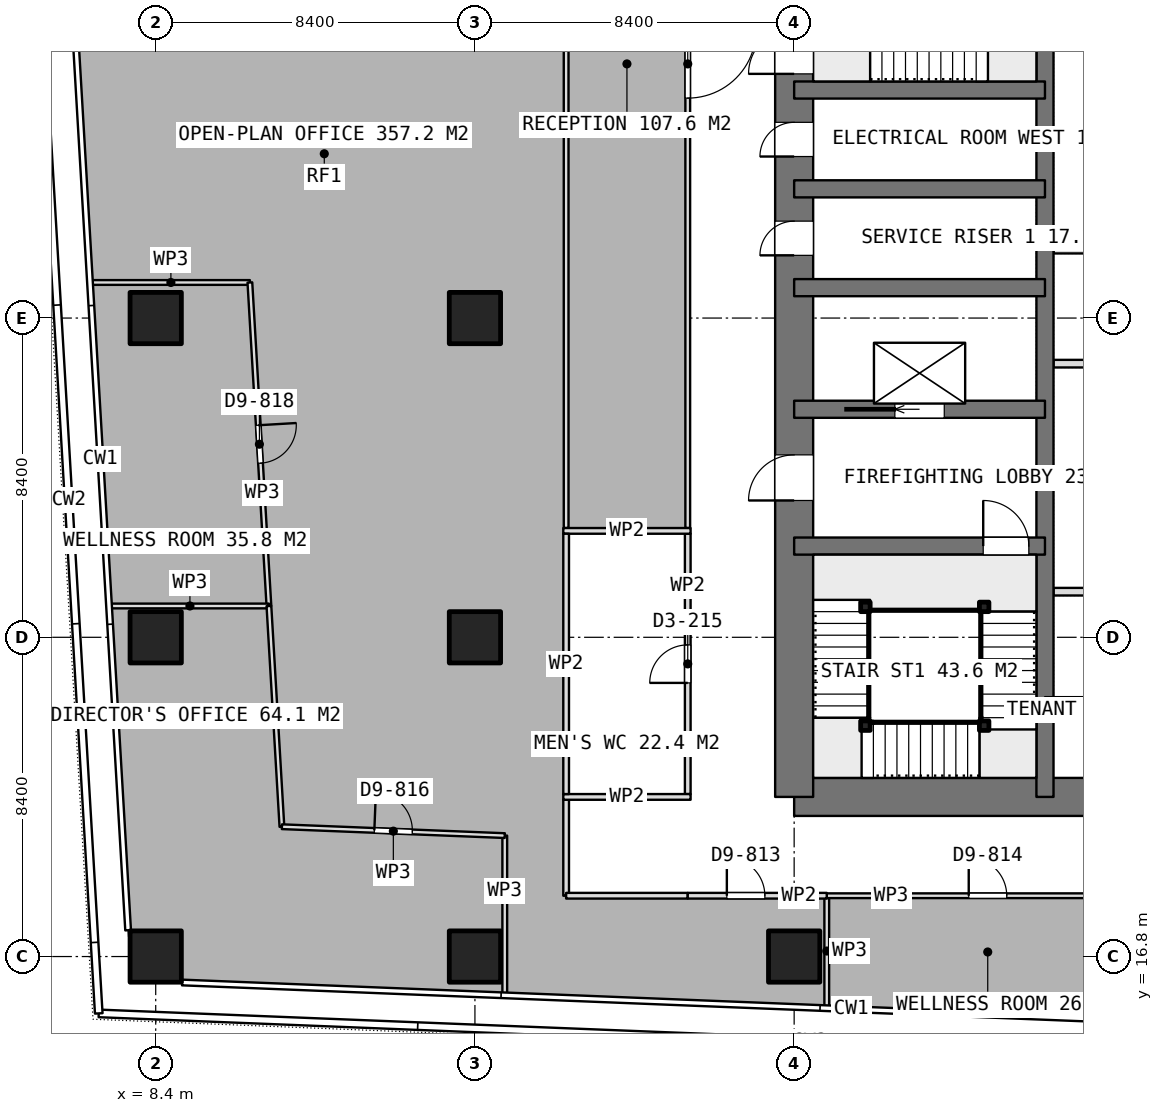
"""IFC4 building model, lengths in metres.
Left out: names, types, materials, properties, quantities, classifications, styles, units other than length and angle.
Written with IfcOpenShell. Run it as: python <this file> out.ifc"""

import sys

from ifc_helpers import new_model, si_unit, direction, frame, frame_2d, origin, origin_2d, place, context, subcontext, project, spatial, rectangle, extrude, element, fill, save


model = new_model("IFC4")
c1 = context("Model", 3, precision=1e-05, world=origin(), true_north=direction((0.0, 1.0)))
c2 = subcontext(c1, "Body", "Model", "MODEL_VIEW")
j1 = project(units=[si_unit("LENGTHUNIT", "METRE"), si_unit("PLANEANGLEUNIT", "RADIAN")], contexts=[c1])
p1 = place(None, origin())
s1 = spatial("IfcSite", under=j1, at=p1, CompositionType="ELEMENT")
p2 = place(p1, origin())
s2 = spatial("IfcBuilding", under=s1, at=p2, CompositionType="ELEMENT")
p3 = place(p2, frame((0.0, 0.0, 202.7)))
s3 = spatial("IfcBuildingStorey", under=s2, at=p3, CompositionType="ELEMENT", Elevation=202.7)
p4 = place(p3, frame((25.2, 21.0, 0.0), z_axis=(0.0, 0.0, 1.0), x_axis=(1.0, 0.0, 0.0)))
e1 = element("IfcWall", 1, at=p4, inside=s3, PredefinedType="SHEAR", context=c2, shape_type="SweptSolid", body=[
    extrude(rectangle(XDim=10.4, YDim=1.0, at=frame_2d((5.2, 0.0))), origin(), (0.0, 0.0, 1.0), 3.75),
])
p5 = place(p3, frame((25.2, 21.0, 0.0), z_axis=(0.0, 0.0, 1.0), x_axis=(0.0, 1.0, 0.0)))
e2 = element("IfcWall", 2, at=p5, inside=s3, PredefinedType="SHEAR", context=c2, shape_type="SweptSolid", body=[
    extrude(rectangle(XDim=25.2, YDim=1.0, at=frame_2d((12.6, 0.0))), origin(), (0.0, 0.0, 1.0), 3.75),
])
p6 = place(p5, frame((7.8, 0.0, 0.0)))
e3 = element("IfcOpeningElement", 3, at=p6, cuts=e2, PredefinedType="OPENING", context=c2, shape_type="SweptSolid", body=[
    extrude(rectangle(XDim=1.2, YDim=2.1, at=frame_2d((0.6, 1.05))), frame((0.0, 0.51, 0.0), z_axis=(0.0, -1.0, 0.0), x_axis=(1.0, 0.0, 0.0)), (0.0, 0.0, 1.0), 1.02),
])
p7 = place(p5, frame((14.25, 0.0, 0.0)))
e4 = element("IfcOpeningElement", 4, at=p7, cuts=e2, PredefinedType="OPENING", context=c2, shape_type="SweptSolid", body=[
    extrude(rectangle(XDim=0.9, YDim=2.1, at=frame_2d((0.45, 1.05))), frame((0.0, 0.51, 0.0), z_axis=(0.0, -1.0, 0.0), x_axis=(1.0, 0.0, 0.0)), (0.0, 0.0, 1.0), 1.02),
])
p8 = place(p5, frame((16.85, 0.0, 0.0)))
e5 = element("IfcOpeningElement", 5, at=p8, cuts=e2, PredefinedType="OPENING", context=c2, shape_type="SweptSolid", body=[
    extrude(rectangle(XDim=0.9, YDim=2.1, at=frame_2d((0.45, 1.05))), frame((0.0, 0.51, 0.0), z_axis=(0.0, -1.0, 0.0), x_axis=(1.0, 0.0, 0.0)), (0.0, 0.0, 1.0), 1.02),
])
p9 = place(p5, frame((19.025, 0.0, 0.0)))
e6 = element("IfcOpeningElement", 6, at=p9, cuts=e2, PredefinedType="OPENING", context=c2, shape_type="SweptSolid", body=[
    extrude(rectangle(XDim=1.2, YDim=2.1, at=frame_2d((0.6, 1.05))), frame((0.0, 0.51, 0.0), z_axis=(0.0, -1.0, 0.0), x_axis=(1.0, 0.0, 0.0)), (0.0, 0.0, 1.0), 1.02),
])
p10 = place(p3, frame((31.8, 21.0, 0.0), z_axis=(0.0, 0.0, 1.0), x_axis=(0.0, 1.0, 0.0)))
e7 = element("IfcWall", 7, at=p10, inside=s3, PredefinedType="SHEAR", context=c2, shape_type="SweptSolid", body=[
    extrude(rectangle(XDim=25.2, YDim=0.45, at=frame_2d((12.6, 0.0))), origin(), (0.0, 0.0, 1.0), 3.75),
])
p11 = place(p3, frame((31.8, 23.4, 0.0), z_axis=(0.0, 0.0, 1.0), x_axis=(1.0, 0.0, 0.0)))
e8 = element("IfcWall", 8, at=p11, inside=s3, PredefinedType="SHEAR", context=c2, shape_type="SweptSolid", body=[
    extrude(rectangle(XDim=3.8, YDim=0.45, at=frame_2d((1.9, 0.0))), origin(), (0.0, 0.0, 1.0), 3.75),
])
p12 = place(p3, frame((25.2, 27.6, 0.0), z_axis=(0.0, 0.0, 1.0), x_axis=(1.0, 0.0, 0.0)))
e9 = element("IfcWall", 9, at=p12, inside=s3, PredefinedType="SHEAR", context=c2, shape_type="SweptSolid", body=[
    extrude(rectangle(XDim=6.6, YDim=0.45, at=frame_2d((3.3, 0.0))), origin(), (0.0, 0.0, 1.0), 3.75),
])
p13 = place(p12, frame((4.975, 0.0, 0.0)))
e10 = element("IfcOpeningElement", 10, at=p13, cuts=e9, PredefinedType="OPENING", context=c2, shape_type="SweptSolid", body=[
    extrude(rectangle(XDim=1.2, YDim=2.1, at=frame_2d((0.6, 1.05))), frame((0.0, 0.235, 0.0), z_axis=(0.0, -1.0, 0.0), x_axis=(1.0, 0.0, 0.0)), (0.0, 0.0, 1.0), 0.47),
])
p14 = place(p3, frame((25.2, 31.2, 0.0), z_axis=(0.0, 0.0, 1.0), x_axis=(1.0, 0.0, 0.0)))
e11 = element("IfcWall", 11, at=p14, inside=s3, PredefinedType="SHEAR", context=c2, shape_type="SweptSolid", body=[
    extrude(rectangle(XDim=6.6, YDim=0.45, at=frame_2d((3.3, 0.0))), origin(), (0.0, 0.0, 1.0), 3.75),
])
p15 = place(p14, frame((2.65, 0.0, 0.0)))
e12 = element("IfcOpeningElement", 12, at=p15, cuts=e11, PredefinedType="OPENING", context=c2, shape_type="SweptSolid", body=[
    extrude(rectangle(XDim=1.3, YDim=2.1, at=frame_2d((0.65, 1.05))), frame((0.0, 0.235, 0.0), z_axis=(0.0, -1.0, 0.0), x_axis=(1.0, 0.0, 0.0)), (0.0, 0.0, 1.0), 0.47),
])
for number, where, z_axis, x_axis in (
    (13, (25.2, 34.4, 0.0), (0.0, 0.0, 1.0), (1.0, 0.0, 0.0)),
    (14, (25.2, 37.0, 0.0), (0.0, 0.0, 1.0), (1.0, 0.0, 0.0)),
    (15, (25.2, 39.6, 0.0), (0.0, 0.0, 1.0), (1.0, 0.0, 0.0)),
):
    element("IfcWall", number, at=place(p3, frame(where, z_axis=z_axis, x_axis=x_axis)), inside=s3, PredefinedType="SHEAR", context=c2, shape_type="SweptSolid", body=[
        extrude(rectangle(XDim=6.6, YDim=0.45, at=frame_2d((3.3, 0.0))), origin(), (0.0, 0.0, 1.0), 3.75),
    ])
for number, where, z_axis, x_axis in (
    (16, (8.4, 16.8, 0.0), (0.0, 0.0, 1.0), (1.0, 0.0, 0.0)),
    (17, (8.4, 25.2, 0.0), (0.0, 0.0, 1.0), (1.0, 0.0, 0.0)),
    (18, (8.4, 33.6, 0.0), (0.0, 0.0, 1.0), (1.0, 0.0, 0.0)),
    (19, (16.8, 16.8, 0.0), (0.0, 0.0, 1.0), (1.0, 0.0, 0.0)),
    (20, (16.8, 25.2, 0.0), (0.0, 0.0, 1.0), (1.0, 0.0, 0.0)),
    (21, (16.8, 33.6, 0.0), (0.0, 0.0, 1.0), (1.0, 0.0, 0.0)),
    (22, (25.2, 16.8, 0.0), (0.0, 0.0, 1.0), (1.0, 0.0, 0.0)),
):
    element("IfcColumn", number, at=place(p3, frame(where, z_axis=z_axis, x_axis=x_axis)), inside=s3, PredefinedType="COLUMN", context=c2, shape_type="SweptSolid", body=[
        extrude(rectangle(XDim=1.35, YDim=1.35, at=origin_2d()), origin(), (0.0, 0.0, 1.0), 3.75),
    ])
for number, where, z_axis, x_axis in (
    (23, (32.025, 26.4, 0.0), (0.0, 0.0, 1.0), (1.0, 0.0, 0.0)),
    (24, (32.025, 29.4, 0.0), (0.0, 0.0, 1.0), (1.0, 0.0, 0.0)),
    (25, (32.025, 32.4, 0.0), (0.0, 0.0, 1.0), (1.0, 0.0, 0.0)),
    (26, (32.025, 35.4, 0.0), (0.0, 0.0, 1.0), (1.0, 0.0, 0.0)),
    (27, (32.025, 38.4, 0.0), (0.0, 0.0, 1.0), (1.0, 0.0, 0.0)),
):
    element("IfcWall", number, at=place(p3, frame(where, z_axis=z_axis, x_axis=x_axis)), inside=s3, PredefinedType="PARTITIONING", context=c2, shape_type="SweptSolid", body=[
        extrude(rectangle(XDim=3.35, YDim=0.2, at=frame_2d((1.675, 0.0))), origin(), (0.0, 0.0, 1.0), 3.5),
    ])
for number, where, z_axis, x_axis in (
    (28, (19.125, 21.0, 0.0), (0.0, 0.0, 1.0), (1.0, 0.0, 0.0)),
    (29, (19.125, 28.0, 0.0), (0.0, 0.0, 1.0), (1.0, 0.0, 0.0)),
):
    element("IfcWall", number, at=place(p3, frame(where, z_axis=z_axis, x_axis=x_axis)), inside=s3, PredefinedType="PARTITIONING", context=c2, shape_type="SweptSolid", body=[
        extrude(rectangle(XDim=3.35, YDim=0.15, at=frame_2d((1.675, 0.0))), origin(), (0.0, 0.0, 1.0), 3.5),
    ])
p16 = place(p3, frame((19.2, 21.075, 0.0), z_axis=(0.0, 0.0, 1.0), x_axis=(0.0, 1.0, 0.0)))
e30 = element("IfcWall", 30, at=p16, inside=s3, PredefinedType="PARTITIONING", context=c2, shape_type="SweptSolid", body=[
    extrude(rectangle(XDim=6.85, YDim=0.15, at=frame_2d((3.425, 0.0))), origin(), (0.0, 0.0, 1.0), 3.5),
])
p17 = place(p3, frame((22.4, 21.075, 0.0), z_axis=(0.0, 0.0, 1.0), x_axis=(0.0, 1.0, 0.0)))
e31 = element("IfcWall", 31, at=p17, inside=s3, PredefinedType="PARTITIONING", context=c2, shape_type="SweptSolid", body=[
    extrude(rectangle(XDim=6.85, YDim=0.15, at=frame_2d((3.425, 0.0))), origin(), (0.0, 0.0, 1.0), 3.5),
])
p18 = place(p17, frame((2.925, 0.0, 0.0)))
e32 = element("IfcOpeningElement", 32, at=p18, cuts=e31, PredefinedType="OPENING", context=c2, shape_type="SweptSolid", body=[
    extrude(rectangle(XDim=1.0, YDim=2.1, at=frame_2d((0.5, 1.05))), frame((0.0, 0.085, 0.0), z_axis=(0.0, -1.0, 0.0), x_axis=(1.0, 0.0, 0.0)), (0.0, 0.0, 1.0), 0.17),
])
p19 = place(p3, frame((6.721, 34.536, 0.0), z_axis=(0.0, 0.0, 1.0), x_axis=(1.0, 0.0, 0.0)))
e33 = element("IfcWall", 33, at=p19, inside=s3, PredefinedType="PARTITIONING", context=c2, shape_type="SweptSolid", body=[
    extrude(rectangle(XDim=4.157, YDim=0.125, at=frame_2d((2.079, 0.0))), origin(), (0.0, 0.0, 1.0), 3.5),
])
p20 = place(p3, frame((10.878, 34.536, 0.0), z_axis=(0.0, 0.0, 1.0), x_axis=(0.058753912615, -0.998272496742, 0.0)))
e34 = element("IfcWall", 34, at=p20, inside=s3, PredefinedType="PARTITIONING", context=c2, shape_type="SweptSolid", body=[
    extrude(rectangle(XDim=8.527, YDim=0.125, at=frame_2d((4.263, 0.0))), origin(), (0.0, 0.0, 1.0), 3.5),
])
p21 = place(p20, frame((3.763, 0.0, 0.0)))
e35 = element("IfcOpeningElement", 35, at=p21, cuts=e34, PredefinedType="OPENING", context=c2, shape_type="SweptSolid", body=[
    extrude(rectangle(XDim=1.0, YDim=2.1, at=frame_2d((0.5, 1.05))), frame((0.0, 0.073, 0.0), z_axis=(0.0, -1.0, 0.0), x_axis=(1.0, 0.0, 0.0)), (0.0, 0.0, 1.0), 0.145),
])
p22 = place(p3, frame((11.379, 26.024, 0.0), z_axis=(0.0, 0.0, 1.0), x_axis=(-1.0, 0.0, 0.0)))
e36 = element("IfcWall", 36, at=p22, inside=s3, PredefinedType="PARTITIONING", context=c2, shape_type="SweptSolid", body=[
    extrude(rectangle(XDim=4.157, YDim=0.125, at=frame_2d((2.079, 0.0))), origin(), (0.0, 0.0, 1.0), 3.5),
])
p23 = place(p3, frame((17.585, 19.982, 0.0), z_axis=(0.0, 0.0, 1.0), x_axis=(0.0, -1.0, 0.0)))
e37 = element("IfcWall", 37, at=p23, inside=s3, PredefinedType="PARTITIONING", context=c2, shape_type="SweptSolid", body=[
    extrude(rectangle(XDim=4.153, YDim=0.125, at=frame_2d((2.076, 0.0))), origin(), (0.0, 0.0, 1.0), 3.5),
])
p24 = place(p3, frame((11.379, 26.023, 0.0), z_axis=(0.0, 0.0, 1.0), x_axis=(0.058800752748, -0.998269738836, 0.0)))
e38 = element("IfcWall", 38, at=p24, inside=s3, PredefinedType="PARTITIONING", context=c2, shape_type="SweptSolid", body=[
    extrude(rectangle(XDim=5.817, YDim=0.125, at=frame_2d((2.908, 0.0))), origin(), (0.0, 0.0, 1.0), 3.5),
])
p25 = place(p3, frame((11.721, 20.216, 0.0), z_axis=(0.0, 0.0, 1.0), x_axis=(0.999203880049, -0.039894938214, 0.0)))
e39 = element("IfcWall", 39, at=p25, inside=s3, PredefinedType="PARTITIONING", context=c2, shape_type="SweptSolid", body=[
    extrude(rectangle(XDim=5.869, YDim=0.125, at=frame_2d((2.934, 0.0))), origin(), (0.0, 0.0, 1.0), 3.5),
])
p26 = place(p25, frame((2.434, 0.0, 0.0)))
e40 = element("IfcOpeningElement", 40, at=p26, cuts=e39, PredefinedType="OPENING", context=c2, shape_type="SweptSolid", body=[
    extrude(rectangle(XDim=1.0, YDim=2.1, at=frame_2d((0.5, 1.05))), frame((0.0, 0.073, 0.0), z_axis=(0.0, -1.0, 0.0), x_axis=(1.0, 0.0, 0.0)), (0.0, 0.0, 1.0), 0.145),
])
p27 = place(p3, frame((26.058, 15.49, 0.0), z_axis=(0.0, 0.0, 1.0), x_axis=(0.0, 1.0, 0.0)))
e41 = element("IfcWall", 41, at=p27, inside=s3, PredefinedType="PARTITIONING", context=c2, shape_type="SweptSolid", body=[
    extrude(rectangle(XDim=2.91, YDim=0.125, at=frame_2d((1.455, 0.0))), origin(), (0.0, 0.0, 1.0), 3.5),
])
p28 = place(p3, frame((26.058, 18.4, 0.0), z_axis=(0.0, 0.0, 1.0), x_axis=(1.0, 0.0, 0.0)))
e42 = element("IfcWall", 42, at=p28, inside=s3, PredefinedType="PARTITIONING", context=c2, shape_type="SweptSolid", body=[
    extrude(rectangle(XDim=8.472, YDim=0.125, at=frame_2d((4.236, 0.0))), origin(), (0.0, 0.0, 1.0), 3.5),
])
p29 = place(p28, frame((3.736, 0.0, 0.0)))
e43 = element("IfcOpeningElement", 43, at=p29, cuts=e42, PredefinedType="OPENING", context=c2, shape_type="SweptSolid", body=[
    extrude(rectangle(XDim=1.0, YDim=2.1, at=frame_2d((0.5, 1.05))), frame((0.0, 0.073, 0.0), z_axis=(0.0, -1.0, 0.0), x_axis=(1.0, 0.0, 0.0)), (0.0, 0.0, 1.0), 0.145),
])
p30 = place(p3, frame((22.4, 52.575, 0.0), z_axis=(0.0, 0.0, 1.0), x_axis=(0.0, -1.0, 0.0)))
e44 = element("IfcWall", 44, at=p30, inside=s3, PredefinedType="PARTITIONING", context=c2, shape_type="SweptSolid", body=[
    extrude(rectangle(XDim=24.5, YDim=0.125, at=frame_2d((12.25, 0.0))), origin(), (0.0, 0.0, 1.0), 3.5),
])
p31 = place(p30, frame((11.388, 0.0, 0.0)))
e45 = element("IfcOpeningElement", 45, at=p31, cuts=e44, PredefinedType="OPENING", context=c2, shape_type="SweptSolid", body=[
    extrude(rectangle(XDim=1.8, YDim=2.1, at=frame_2d((0.9, 1.05))), frame((0.0, 0.073, 0.0), z_axis=(0.0, -1.0, 0.0), x_axis=(1.0, 0.0, 0.0)), (0.0, 0.0, 1.0), 0.145),
])
p32 = place(p3, frame((19.2, 28.075, 0.0), z_axis=(0.0, 0.0, 1.0), x_axis=(0.0, 1.0, 0.0)))
e46 = element("IfcWall", 46, at=p32, inside=s3, PredefinedType="PARTITIONING", context=c2, shape_type="SweptSolid", body=[
    extrude(rectangle(XDim=28.503, YDim=0.125, at=frame_2d((14.251, 0.0))), origin(), (0.0, 0.0, 1.0), 3.5),
])
p33 = place(p3, frame((19.2, 20.925, 0.0), z_axis=(0.0, 0.0, 1.0), x_axis=(0.0, -1.0, 0.0)))
e47 = element("IfcWall", 47, at=p33, inside=s3, PredefinedType="PARTITIONING", context=c2, shape_type="SweptSolid", body=[
    extrude(rectangle(XDim=2.525, YDim=0.15, at=frame_2d((1.263, 0.0))), origin(), (0.0, 0.0, 1.0), 3.5),
])
p34 = place(p3, frame((19.2, 18.4, 0.0), z_axis=(0.0, 0.0, 1.0), x_axis=(1.0, 0.0, 0.0)))
e48 = element("IfcWall", 48, at=p34, inside=s3, PredefinedType="PARTITIONING", context=c2, shape_type="SweptSolid", body=[
    extrude(rectangle(XDim=3.2, YDim=0.15, at=frame_2d((1.6, 0.0))), origin(), (0.0, 0.0, 1.0), 3.5),
])
p35 = place(p3, frame((22.4, 18.4, 0.0), z_axis=(0.0, 0.0, 1.0), x_axis=(1.0, 0.0, 0.0)))
e49 = element("IfcWall", 49, at=p35, inside=s3, PredefinedType="PARTITIONING", context=c2, shape_type="SweptSolid", body=[
    extrude(rectangle(XDim=3.658, YDim=0.15, at=frame_2d((1.829, 0.0))), origin(), (0.0, 0.0, 1.0), 3.5),
])
p36 = place(p35, frame((1.029, 0.0, 0.0)))
e50 = element("IfcOpeningElement", 50, at=p36, cuts=e49, PredefinedType="OPENING", context=c2, shape_type="SweptSolid", body=[
    extrude(rectangle(XDim=1.0, YDim=2.1, at=frame_2d((0.5, 1.05))), frame((0.0, 0.085, 0.0), z_axis=(0.0, -1.0, 0.0), x_axis=(1.0, 0.0, 0.0)), (0.0, 0.0, 1.0), 0.17),
])
for number, where, z_axis, x_axis in (
    (51, (30.2, 26.0, 0.0), (0.0, 0.0, 1.0), (1.0, 0.0, 0.0)),
    (52, (30.2, 22.875, 0.0), (0.0, 0.0, 1.0), (1.0, 0.0, 0.0)),
    (53, (27.075, 22.875, 0.0), (0.0, 0.0, 1.0), (1.0, 0.0, 0.0)),
    (54, (27.075, 26.0, 0.0), (0.0, 0.0, 1.0), (1.0, 0.0, 0.0)),
):
    element("IfcColumn", number, at=place(p3, frame(where, z_axis=z_axis, x_axis=x_axis)), inside=s3, PredefinedType="COLUMN", context=c2, shape_type="SweptSolid", body=[
        extrude(rectangle(XDim=0.25, YDim=0.25, at=origin_2d()), origin(), (0.0, 0.0, 1.0), 3.75),
    ])
p37 = place(p6, origin())
e55 = element("IfcDoor", 55, at=p37, inside=s3, OperationType="SINGLE_SWING_LEFT", PredefinedType="DOOR", context=c2, shape_type="SweptSolid", body=[
    extrude(rectangle(XDim=1.2, YDim=2.1, at=frame_2d((0.6, 1.05))), frame((0.0, 0.025, 0.0), z_axis=(0.0, -1.0, 0.0), x_axis=(1.0, 0.0, 0.0)), (0.0, 0.0, 1.0), 0.05),
])
fill(e3, e55)
p38 = place(p7, origin())
e56 = element("IfcDoor", 56, at=p38, inside=s3, OperationType="SINGLE_SWING_LEFT", PredefinedType="DOOR", context=c2, shape_type="SweptSolid", body=[
    extrude(rectangle(XDim=0.9, YDim=2.1, at=frame_2d((0.45, 1.05))), frame((0.0, 0.025, 0.0), z_axis=(0.0, -1.0, 0.0), x_axis=(1.0, 0.0, 0.0)), (0.0, 0.0, 1.0), 0.05),
])
fill(e4, e56)
p39 = place(p8, origin())
e57 = element("IfcDoor", 57, at=p39, inside=s3, OperationType="SINGLE_SWING_LEFT", PredefinedType="DOOR", context=c2, shape_type="SweptSolid", body=[
    extrude(rectangle(XDim=0.9, YDim=2.1, at=frame_2d((0.45, 1.05))), frame((0.0, 0.025, 0.0), z_axis=(0.0, -1.0, 0.0), x_axis=(1.0, 0.0, 0.0)), (0.0, 0.0, 1.0), 0.05),
])
fill(e5, e57)
p40 = place(p15, origin())
e58 = element("IfcDoor", 58, at=p40, inside=s3, OperationType="SLIDING_TO_LEFT", PredefinedType="USERDEFINED", context=c2, shape_type="SweptSolid", body=[
    extrude(rectangle(XDim=1.3, YDim=2.1, at=frame_2d((0.65, 1.05))), frame((0.0, 0.025, 0.0), z_axis=(0.0, -1.0, 0.0), x_axis=(1.0, 0.0, 0.0)), (0.0, 0.0, 1.0), 0.05),
])
fill(e12, e58)
p41 = place(p18, origin())
e59 = element("IfcDoor", 59, at=p41, inside=s3, OperationType="SINGLE_SWING_LEFT", PredefinedType="DOOR", context=c2, shape_type="SweptSolid", body=[
    extrude(rectangle(XDim=1.0, YDim=2.1, at=frame_2d((0.5, 1.05))), frame((0.0, 0.025, 0.0), z_axis=(0.0, -1.0, 0.0), x_axis=(1.0, 0.0, 0.0)), (0.0, 0.0, 1.0), 0.05),
])
fill(e32, e59)
p42 = place(p21, origin())
e60 = element("IfcDoor", 60, at=p42, inside=s3, OperationType="SINGLE_SWING_LEFT", PredefinedType="DOOR", context=c2, shape_type="SweptSolid", body=[
    extrude(rectangle(XDim=1.0, YDim=2.1, at=frame_2d((0.5, 1.05))), frame((0.0, 0.025, 0.0), z_axis=(0.0, -1.0, 0.0), x_axis=(1.0, 0.0, 0.0)), (0.0, 0.0, 1.0), 0.05),
])
fill(e35, e60)
p43 = place(p26, origin())
e61 = element("IfcDoor", 61, at=p43, inside=s3, OperationType="SINGLE_SWING_LEFT", PredefinedType="DOOR", context=c2, shape_type="SweptSolid", body=[
    extrude(rectangle(XDim=1.0, YDim=2.1, at=frame_2d((0.5, 1.05))), frame((0.0, 0.025, 0.0), z_axis=(0.0, -1.0, 0.0), x_axis=(1.0, 0.0, 0.0)), (0.0, 0.0, 1.0), 0.05),
])
fill(e40, e61)
p44 = place(p29, origin())
e62 = element("IfcDoor", 62, at=p44, inside=s3, OperationType="SINGLE_SWING_LEFT", PredefinedType="DOOR", context=c2, shape_type="SweptSolid", body=[
    extrude(rectangle(XDim=1.0, YDim=2.1, at=frame_2d((0.5, 1.05))), frame((0.0, 0.025, 0.0), z_axis=(0.0, -1.0, 0.0), x_axis=(1.0, 0.0, 0.0)), (0.0, 0.0, 1.0), 0.05),
])
fill(e43, e62)
p45 = place(p31, origin())
e63 = element("IfcDoor", 63, at=p45, inside=s3, OperationType="DOUBLE_DOOR_SINGLE_SWING", PredefinedType="DOOR", context=c2, shape_type="SweptSolid", body=[
    extrude(rectangle(XDim=1.8, YDim=2.1, at=frame_2d((0.9, 1.05))), frame((0.0, 0.025, 0.0), z_axis=(0.0, -1.0, 0.0), x_axis=(1.0, 0.0, 0.0)), (0.0, 0.0, 1.0), 0.05),
])
fill(e45, e63)
p46 = place(p36, origin())
e64 = element("IfcDoor", 64, at=p46, inside=s3, OperationType="SINGLE_SWING_LEFT", PredefinedType="DOOR", context=c2, shape_type="SweptSolid", body=[
    extrude(rectangle(XDim=1.0, YDim=2.1, at=frame_2d((0.5, 1.05))), frame((0.0, 0.025, 0.0), z_axis=(0.0, -1.0, 0.0), x_axis=(1.0, 0.0, 0.0)), (0.0, 0.0, 1.0), 0.05),
])
fill(e50, e64)
p47 = place(p13, origin())
e65 = element("IfcDoor", 65, at=p47, inside=s3, OperationType="SINGLE_SWING_RIGHT", PredefinedType="DOOR", context=c2, shape_type="SweptSolid", body=[
    extrude(rectangle(XDim=1.2, YDim=2.1, at=frame_2d((0.6, 1.05))), frame((0.0, 0.025, 0.0), z_axis=(0.0, -1.0, 0.0), x_axis=(1.0, 0.0, 0.0)), (0.0, 0.0, 1.0), 0.05),
])
fill(e10, e65)
p48 = place(p9, origin())
e66 = element("IfcDoor", 66, at=p48, inside=s3, OperationType="SINGLE_SWING_RIGHT", PredefinedType="DOOR", context=c2, shape_type="SweptSolid", body=[
    extrude(rectangle(XDim=1.2, YDim=2.1, at=frame_2d((0.6, 1.05))), frame((0.0, 0.025, 0.0), z_axis=(0.0, -1.0, 0.0), x_axis=(1.0, 0.0, 0.0)), (0.0, 0.0, 1.0), 0.05),
])
fill(e6, e66)
save(model, sys.argv[1])
